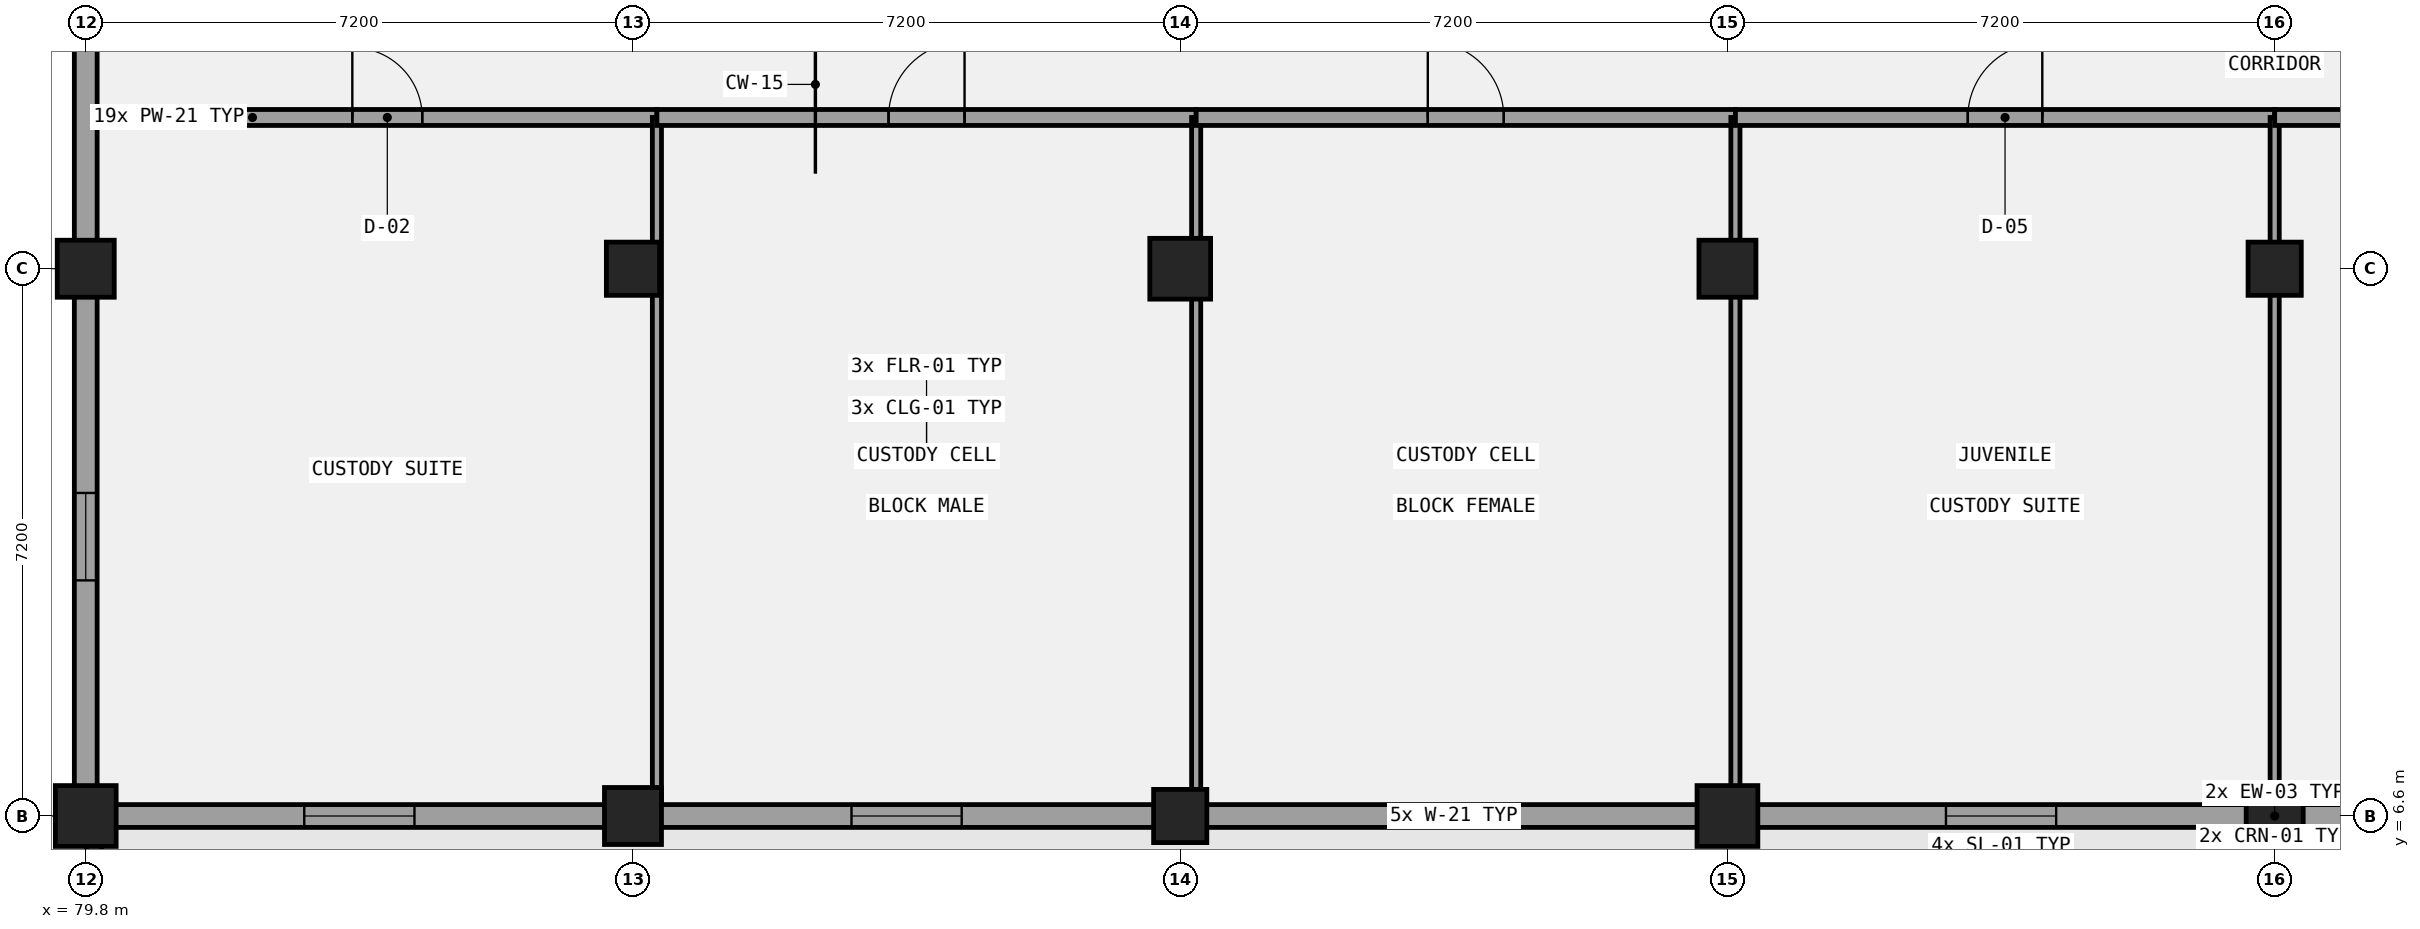
"""IFC4 building model, lengths in metres.
Left out: names, types, materials, properties, quantities, classifications, styles, units other than length and angle.
Written with IfcOpenShell. Run it as: python <this file> out.ifc"""

import sys

from ifc_helpers import new_model, si_unit, direction, frame, frame_2d, origin, origin_2d, place, context, subcontext, project, spatial, rectangle, extrude, element, fill, save


model = new_model("IFC4")
c1 = context("Model", 3, precision=1e-05, world=origin(), true_north=direction((0.0, 1.0)))
c2 = subcontext(c1, "Body", "Model", "MODEL_VIEW")
j1 = project(units=[si_unit("LENGTHUNIT", "METRE"), si_unit("PLANEANGLEUNIT", "RADIAN")], contexts=[c1])
p1 = place(None, origin())
s1 = spatial("IfcSite", under=j1, at=p1, CompositionType="ELEMENT")
p2 = place(p1, origin())
s2 = spatial("IfcBuilding", under=s1, at=p2, CompositionType="ELEMENT")
p3 = place(p2, frame((0.0, 0.0, 5.4)))
s3 = spatial("IfcBuildingStorey", under=s2, at=p3, CompositionType="ELEMENT", Elevation=5.4)
p4 = place(p3, frame((79.8, 6.6, 0.0), z_axis=(0.0, 0.0, 1.0), x_axis=(1.0, 0.0, 0.0)))
e1 = element("IfcColumn", 1, at=p4, inside=s3, PredefinedType="COLUMN", context=c2, shape_type="SweptSolid", body=[
    extrude(rectangle(XDim=0.8, YDim=0.8, at=origin_2d()), origin(), (0.0, 0.0, 1.0), 4.2),
])
for number, where, z_axis, x_axis in (
    (2, (79.8, 13.8, 0.0), (0.0, 0.0, 1.0), (1.0, 0.0, 0.0)),
    (3, (87.0, 6.6, 0.0), (0.0, 0.0, 1.0), (1.0, 0.0, 0.0)),
):
    element("IfcColumn", number, at=place(p3, frame(where, z_axis=z_axis, x_axis=x_axis)), inside=s3, PredefinedType="COLUMN", context=c2, shape_type="SweptSolid", body=[
        extrude(rectangle(XDim=0.75, YDim=0.75, at=origin_2d()), origin(), (0.0, 0.0, 1.0), 4.2),
    ])
for number, where, z_axis, x_axis in (
    (4, (87.0, 13.8, 0.0), (0.0, 0.0, 1.0), (1.0, 0.0, 0.0)),
    (5, (94.2, 6.6, 0.0), (0.0, 0.0, 1.0), (1.0, 0.0, 0.0)),
):
    element("IfcColumn", number, at=place(p3, frame(where, z_axis=z_axis, x_axis=x_axis)), inside=s3, PredefinedType="COLUMN", context=c2, shape_type="SweptSolid", body=[
        extrude(rectangle(XDim=0.7, YDim=0.7, at=origin_2d()), origin(), (0.0, 0.0, 1.0), 4.2),
    ])
for number, where, z_axis, x_axis in (
    (6, (94.2, 13.8, 0.0), (0.0, 0.0, 1.0), (1.0, 0.0, 0.0)),
    (7, (101.4, 6.6, 0.0), (0.0, 0.0, 1.0), (1.0, 0.0, 0.0)),
):
    element("IfcColumn", number, at=place(p3, frame(where, z_axis=z_axis, x_axis=x_axis)), inside=s3, PredefinedType="COLUMN", context=c2, shape_type="SweptSolid", body=[
        extrude(rectangle(XDim=0.8, YDim=0.8, at=origin_2d()), origin(), (0.0, 0.0, 1.0), 4.2),
    ])
for number, where, z_axis, x_axis in (
    (8, (101.4, 13.8, 0.0), (0.0, 0.0, 1.0), (1.0, 0.0, 0.0)),
    (9, (108.6, 6.6, 0.0), (0.0, 0.0, 1.0), (1.0, 0.0, 0.0)),
):
    element("IfcColumn", number, at=place(p3, frame(where, z_axis=z_axis, x_axis=x_axis)), inside=s3, PredefinedType="COLUMN", context=c2, shape_type="SweptSolid", body=[
        extrude(rectangle(XDim=0.75, YDim=0.75, at=origin_2d()), origin(), (0.0, 0.0, 1.0), 4.2),
    ])
p5 = place(p3, frame((108.6, 13.8, 0.0), z_axis=(0.0, 0.0, 1.0), x_axis=(1.0, 0.0, 0.0)))
e10 = element("IfcColumn", 10, at=p5, inside=s3, PredefinedType="COLUMN", context=c2, shape_type="SweptSolid", body=[
    extrude(rectangle(XDim=0.7, YDim=0.7, at=origin_2d()), origin(), (0.0, 0.0, 1.0), 4.2),
])
p6 = place(p3, frame((79.8, 27.95, 0.0), z_axis=(0.0, 0.0, 1.0), x_axis=(0.0, -1.0, 0.0)))
e11 = element("IfcWall", 11, at=p6, inside=s3, PredefinedType="SOLIDWALL", context=c2, shape_type="SweptSolid", body=[
    extrude(rectangle(XDim=21.2, YDim=0.3, at=frame_2d((10.6, 0.0))), origin(), (0.0, 0.0, 1.0), 3.27),
])
p7 = place(p6, frame((17.1, 0.0, 1.0)))
e12 = element("IfcOpeningElement", 12, at=p7, cuts=e11, PredefinedType="OPENING", context=c2, shape_type="SweptSolid", body=[
    extrude(rectangle(XDim=1.15, YDim=1.65, at=frame_2d((0.575, 0.825))), frame((0.0, 0.16, 0.0), z_axis=(0.0, -1.0, 0.0), x_axis=(1.0, 0.0, 0.0)), (0.0, 0.0, 1.0), 0.32),
])
p8 = place(p6, frame((9.975, 0.0, 1.0)))
e13 = element("IfcOpeningElement", 13, at=p8, cuts=e11, PredefinedType="OPENING", context=c2, shape_type="SweptSolid", body=[
    extrude(rectangle(XDim=1.15, YDim=1.65, at=frame_2d((0.575, 0.825))), frame((0.0, 0.16, 0.0), z_axis=(0.0, -1.0, 0.0), x_axis=(1.0, 0.0, 0.0)), (0.0, 0.0, 1.0), 0.32),
])
p9 = place(p6, frame((2.9, 0.0, 1.0)))
e14 = element("IfcOpeningElement", 14, at=p9, cuts=e11, PredefinedType="OPENING", context=c2, shape_type="SweptSolid", body=[
    extrude(rectangle(XDim=1.15, YDim=1.65, at=frame_2d((0.575, 0.825))), frame((0.0, 0.16, 0.0), z_axis=(0.0, -1.0, 0.0), x_axis=(1.0, 0.0, 0.0)), (0.0, 0.0, 1.0), 0.32),
])
p10 = place(p3, frame((79.65, 6.6, 0.0), z_axis=(0.0, 0.0, 1.0), x_axis=(1.0, 0.0, 0.0)))
e15 = element("IfcWall", 15, at=p10, inside=s3, PredefinedType="SOLIDWALL", context=c2, shape_type="SweptSolid", body=[
    extrude(rectangle(XDim=57.9, YDim=0.3, at=frame_2d((28.95, 0.0))), origin(), (0.0, 0.0, 1.0), 2.92),
])
p11 = place(p10, frame((3.025, 0.0, 1.0)))
e16 = element("IfcOpeningElement", 16, at=p11, cuts=e15, PredefinedType="OPENING", context=c2, shape_type="SweptSolid", body=[
    extrude(rectangle(XDim=1.45, YDim=1.4, at=frame_2d((0.725, 0.7))), frame((0.0, 0.16, 0.0), z_axis=(0.0, -1.0, 0.0), x_axis=(1.0, 0.0, 0.0)), (0.0, 0.0, 1.0), 0.32),
])
p12 = place(p10, frame((10.225, 0.0, 1.0)))
e17 = element("IfcOpeningElement", 17, at=p12, cuts=e15, PredefinedType="OPENING", context=c2, shape_type="SweptSolid", body=[
    extrude(rectangle(XDim=1.45, YDim=1.4, at=frame_2d((0.725, 0.7))), frame((0.0, 0.16, 0.0), z_axis=(0.0, -1.0, 0.0), x_axis=(1.0, 0.0, 0.0)), (0.0, 0.0, 1.0), 0.32),
])
p13 = place(p10, frame((17.425, 0.0, 1.0)))
e18 = element("IfcOpeningElement", 18, at=p13, cuts=e15, PredefinedType="OPENING", context=c2, shape_type="SweptSolid", body=[
    extrude(rectangle(XDim=1.45, YDim=1.4, at=frame_2d((0.725, 0.7))), frame((0.0, 0.16, 0.0), z_axis=(0.0, -1.0, 0.0), x_axis=(1.0, 0.0, 0.0)), (0.0, 0.0, 1.0), 0.32),
])
p14 = place(p10, frame((24.625, 0.0, 1.0)))
e19 = element("IfcOpeningElement", 19, at=p14, cuts=e15, PredefinedType="OPENING", context=c2, shape_type="SweptSolid", body=[
    extrude(rectangle(XDim=1.45, YDim=1.4, at=frame_2d((0.725, 0.7))), frame((0.0, 0.16, 0.0), z_axis=(0.0, -1.0, 0.0), x_axis=(1.0, 0.0, 0.0)), (0.0, 0.0, 1.0), 0.32),
])
p15 = place(p10, frame((31.825, 0.0, 1.0)))
e20 = element("IfcOpeningElement", 20, at=p15, cuts=e15, PredefinedType="OPENING", context=c2, shape_type="SweptSolid", body=[
    extrude(rectangle(XDim=1.45, YDim=1.4, at=frame_2d((0.725, 0.7))), frame((0.0, 0.16, 0.0), z_axis=(0.0, -1.0, 0.0), x_axis=(1.0, 0.0, 0.0)), (0.0, 0.0, 1.0), 0.32),
])
p16 = place(p10, frame((39.025, 0.0, 1.0)))
e21 = element("IfcOpeningElement", 21, at=p16, cuts=e15, PredefinedType="OPENING", context=c2, shape_type="SweptSolid", body=[
    extrude(rectangle(XDim=1.45, YDim=1.4, at=frame_2d((0.725, 0.7))), frame((0.0, 0.16, 0.0), z_axis=(0.0, -1.0, 0.0), x_axis=(1.0, 0.0, 0.0)), (0.0, 0.0, 1.0), 0.32),
])
p17 = place(p10, frame((46.225, 0.0, 1.0)))
e22 = element("IfcOpeningElement", 22, at=p17, cuts=e15, PredefinedType="OPENING", context=c2, shape_type="SweptSolid", body=[
    extrude(rectangle(XDim=1.45, YDim=1.4, at=frame_2d((0.725, 0.7))), frame((0.0, 0.16, 0.0), z_axis=(0.0, -1.0, 0.0), x_axis=(1.0, 0.0, 0.0)), (0.0, 0.0, 1.0), 0.32),
])
p18 = place(p10, frame((53.425, 0.0, 1.0)))
e23 = element("IfcOpeningElement", 23, at=p18, cuts=e15, PredefinedType="OPENING", context=c2, shape_type="SweptSolid", body=[
    extrude(rectangle(XDim=1.45, YDim=1.4, at=frame_2d((0.725, 0.7))), frame((0.0, 0.16, 0.0), z_axis=(0.0, -1.0, 0.0), x_axis=(1.0, 0.0, 0.0)), (0.0, 0.0, 1.0), 0.32),
])
p19 = place(p3, frame((79.91, 0.22, 0.0), z_axis=(0.0, 0.0, 1.0), x_axis=(0.0, 1.0, 0.0)))
e24 = element("IfcWall", 24, at=p19, inside=s3, PredefinedType="PARAPET", context=c2, shape_type="SweptSolid", body=[
    extrude(rectangle(XDim=6.05, YDim=0.2, at=frame_2d((3.025, 0.0))), origin(), (0.0, 0.0, 1.0), 1.12),
])
p20 = place(p3, frame((80.22, 15.79, 0.0), z_axis=(0.0, 0.0, 1.0), x_axis=(1.0, 0.0, 0.0)))
e25 = element("IfcWall", 25, at=p20, inside=s3, PredefinedType="PARTITIONING", context=c2, shape_type="SweptSolid", body=[
    extrude(rectangle(XDim=7.095, YDim=0.21, at=frame_2d((3.547, 0.0))), origin(), (0.0, 0.0, 1.0), 3.62),
])
p21 = place(p20, frame((3.087, 0.0, 0.0)))
e26 = element("IfcOpeningElement", 26, at=p21, cuts=e25, PredefinedType="OPENING", context=c2, shape_type="SweptSolid", body=[
    extrude(rectangle(XDim=0.92, YDim=2.22, at=frame_2d((0.46, 1.11))), frame((0.0, 0.115, 0.0), z_axis=(0.0, -1.0, 0.0), x_axis=(1.0, 0.0, 0.0)), (0.0, 0.0, 1.0), 0.23),
])
p22 = place(p3, frame((87.315, 6.78, 0.0), z_axis=(0.0, 0.0, 1.0), x_axis=(0.0, 1.0, 0.0)))
e27 = element("IfcWall", 27, at=p22, inside=s3, PredefinedType="PARTITIONING", context=c2, shape_type="SweptSolid", body=[
    extrude(rectangle(XDim=9.01, YDim=0.12, at=frame_2d((4.505, 0.0))), origin(), (0.0, 0.0, 1.0), 3.92),
])
p23 = place(p3, frame((87.315, 15.79, 0.0), z_axis=(0.0, 0.0, 1.0), x_axis=(1.0, 0.0, 0.0)))
e28 = element("IfcWall", 28, at=p23, inside=s3, PredefinedType="PARTITIONING", context=c2, shape_type="SweptSolid", body=[
    extrude(rectangle(XDim=7.095, YDim=0.21, at=frame_2d((3.547, 0.0))), origin(), (0.0, 0.0, 1.0), 3.56),
])
p24 = place(p23, frame((3.048, 0.0, 0.0)))
e29 = element("IfcOpeningElement", 29, at=p24, cuts=e28, PredefinedType="OPENING", context=c2, shape_type="SweptSolid", body=[
    extrude(rectangle(XDim=1.0, YDim=2.15, at=frame_2d((0.5, 1.075))), frame((0.0, 0.115, 0.0), z_axis=(0.0, -1.0, 0.0), x_axis=(1.0, 0.0, 0.0)), (0.0, 0.0, 1.0), 0.23),
])
p25 = place(p3, frame((94.41, 6.78, 0.0), z_axis=(0.0, 0.0, 1.0), x_axis=(0.0, 1.0, 0.0)))
e30 = element("IfcWall", 30, at=p25, inside=s3, PredefinedType="PARTITIONING", context=c2, shape_type="SweptSolid", body=[
    extrude(rectangle(XDim=9.01, YDim=0.12, at=frame_2d((4.505, 0.0))), origin(), (0.0, 0.0, 1.0), 3.17),
])
p26 = place(p3, frame((94.41, 15.79, 0.0), z_axis=(0.0, 0.0, 1.0), x_axis=(1.0, 0.0, 0.0)))
e31 = element("IfcWall", 31, at=p26, inside=s3, PredefinedType="PARTITIONING", context=c2, shape_type="SweptSolid", body=[
    extrude(rectangle(XDim=7.095, YDim=0.21, at=frame_2d((3.547, 0.0))), origin(), (0.0, 0.0, 1.0), 3.37),
])
p27 = place(p26, frame((3.048, 0.0, 0.0)))
e32 = element("IfcOpeningElement", 32, at=p27, cuts=e31, PredefinedType="OPENING", context=c2, shape_type="SweptSolid", body=[
    extrude(rectangle(XDim=1.0, YDim=2.15, at=frame_2d((0.5, 1.075))), frame((0.0, 0.115, 0.0), z_axis=(0.0, -1.0, 0.0), x_axis=(1.0, 0.0, 0.0)), (0.0, 0.0, 1.0), 0.23),
])
p28 = place(p3, frame((101.505, 6.78, 0.0), z_axis=(0.0, 0.0, 1.0), x_axis=(0.0, 1.0, 0.0)))
e33 = element("IfcWall", 33, at=p28, inside=s3, PredefinedType="PARTITIONING", context=c2, shape_type="SweptSolid", body=[
    extrude(rectangle(XDim=9.01, YDim=0.12, at=frame_2d((4.505, 0.0))), origin(), (0.0, 0.0, 1.0), 3.17),
])
p29 = place(p3, frame((101.505, 15.79, 0.0), z_axis=(0.0, 0.0, 1.0), x_axis=(1.0, 0.0, 0.0)))
e34 = element("IfcWall", 34, at=p29, inside=s3, PredefinedType="PARTITIONING", context=c2, shape_type="SweptSolid", body=[
    extrude(rectangle(XDim=7.095, YDim=0.21, at=frame_2d((3.548, 0.0))), origin(), (0.0, 0.0, 1.0), 3.37),
])
p30 = place(p29, frame((3.058, 0.0, 0.0)))
e35 = element("IfcOpeningElement", 35, at=p30, cuts=e34, PredefinedType="OPENING", context=c2, shape_type="SweptSolid", body=[
    extrude(rectangle(XDim=0.98, YDim=2.22, at=frame_2d((0.49, 1.11))), frame((0.0, 0.115, 0.0), z_axis=(0.0, -1.0, 0.0), x_axis=(1.0, 0.0, 0.0)), (0.0, 0.0, 1.0), 0.23),
])
p31 = place(p3, frame((108.6, 6.78, 0.0), z_axis=(0.0, 0.0, 1.0), x_axis=(0.0, 1.0, 0.0)))
e36 = element("IfcWall", 36, at=p31, inside=s3, PredefinedType="PARTITIONING", context=c2, shape_type="SweptSolid", body=[
    extrude(rectangle(XDim=9.01, YDim=0.12, at=frame_2d((4.505, 0.0))), origin(), (0.0, 0.0, 1.0), 3.12),
])
p32 = place(p3, frame((108.6, 15.79, 0.0), z_axis=(0.0, 0.0, 1.0), x_axis=(1.0, 0.0, 0.0)))
e37 = element("IfcWall", 37, at=p32, inside=s3, PredefinedType="PARTITIONING", context=c2, shape_type="SweptSolid", body=[
    extrude(rectangle(XDim=7.095, YDim=0.21, at=frame_2d((3.547, 0.0))), origin(), (0.0, 0.0, 1.0), 3.37),
])
p33 = place(p32, frame((3.058, 0.0, 0.0)))
e38 = element("IfcOpeningElement", 38, at=p33, cuts=e37, PredefinedType="OPENING", context=c2, shape_type="SweptSolid", body=[
    extrude(rectangle(XDim=0.98, YDim=2.35, at=frame_2d((0.49, 1.175))), frame((0.0, 0.115, 0.0), z_axis=(0.0, -1.0, 0.0), x_axis=(1.0, 0.0, 0.0)), (0.0, 0.0, 1.0), 0.23),
])
p34 = place(p7, origin())
e39 = element("IfcWindow", 39, at=p34, inside=s3, PartitioningType="SINGLE_PANEL", PredefinedType="WINDOW", context=c2, shape_type="SweptSolid", body=[
    extrude(rectangle(XDim=1.15, YDim=1.65, at=frame_2d((0.575, 0.825))), frame((0.0, 0.03, 0.0), z_axis=(0.0, -1.0, 0.0), x_axis=(1.0, 0.0, 0.0)), (0.0, 0.0, 1.0), 0.06),
])
fill(e12, e39)
p35 = place(p11, origin())
e40 = element("IfcWindow", 40, at=p35, inside=s3, PartitioningType="SINGLE_PANEL", PredefinedType="WINDOW", context=c2, shape_type="SweptSolid", body=[
    extrude(rectangle(XDim=1.45, YDim=1.4, at=frame_2d((0.725, 0.7))), frame((0.0, 0.03, 0.0), z_axis=(0.0, -1.0, 0.0), x_axis=(1.0, 0.0, 0.0)), (0.0, 0.0, 1.0), 0.06),
])
fill(e16, e40)
p36 = place(p12, origin())
e41 = element("IfcWindow", 41, at=p36, inside=s3, PartitioningType="SINGLE_PANEL", PredefinedType="WINDOW", context=c2, shape_type="SweptSolid", body=[
    extrude(rectangle(XDim=1.45, YDim=1.4, at=frame_2d((0.725, 0.7))), frame((0.0, 0.03, 0.0), z_axis=(0.0, -1.0, 0.0), x_axis=(1.0, 0.0, 0.0)), (0.0, 0.0, 1.0), 0.06),
])
fill(e17, e41)
p37 = place(p13, origin())
e42 = element("IfcWindow", 42, at=p37, inside=s3, PartitioningType="SINGLE_PANEL", PredefinedType="WINDOW", context=c2, shape_type="SweptSolid", body=[
    extrude(rectangle(XDim=1.45, YDim=1.4, at=frame_2d((0.725, 0.7))), frame((0.0, 0.03, 0.0), z_axis=(0.0, -1.0, 0.0), x_axis=(1.0, 0.0, 0.0)), (0.0, 0.0, 1.0), 0.06),
])
fill(e18, e42)
p38 = place(p14, origin())
e43 = element("IfcWindow", 43, at=p38, inside=s3, PartitioningType="SINGLE_PANEL", PredefinedType="WINDOW", context=c2, shape_type="SweptSolid", body=[
    extrude(rectangle(XDim=1.45, YDim=1.4, at=frame_2d((0.725, 0.7))), frame((0.0, 0.03, 0.0), z_axis=(0.0, -1.0, 0.0), x_axis=(1.0, 0.0, 0.0)), (0.0, 0.0, 1.0), 0.06),
])
fill(e19, e43)
p39 = place(p21, frame((0.92, 0.0, 0.0), z_axis=(0.0, 0.0, 1.0), x_axis=(-1.0, 0.0, 0.0)))
e44 = element("IfcDoor", 44, at=p39, inside=s3, OperationType="SINGLE_SWING_LEFT", PredefinedType="DOOR", context=c2, shape_type="SweptSolid", body=[
    extrude(rectangle(XDim=0.92, YDim=2.22, at=frame_2d((0.46, 1.11))), frame((0.0, 0.025, 0.0), z_axis=(0.0, -1.0, 0.0), x_axis=(1.0, 0.0, 0.0)), (0.0, 0.0, 1.0), 0.05),
])
fill(e26, e44)
p40 = place(p24, frame((1.0, 0.0, 0.0), z_axis=(0.0, 0.0, 1.0), x_axis=(-1.0, 0.0, 0.0)))
e45 = element("IfcDoor", 45, at=p40, inside=s3, OperationType="SINGLE_SWING_RIGHT", PredefinedType="DOOR", context=c2, shape_type="SweptSolid", body=[
    extrude(rectangle(XDim=1.0, YDim=2.15, at=frame_2d((0.5, 1.075))), frame((0.0, 0.025, 0.0), z_axis=(0.0, -1.0, 0.0), x_axis=(1.0, 0.0, 0.0)), (0.0, 0.0, 1.0), 0.05),
])
fill(e29, e45)
p41 = place(p27, frame((1.0, 0.0, 0.0), z_axis=(0.0, 0.0, 1.0), x_axis=(-1.0, 0.0, 0.0)))
e46 = element("IfcDoor", 46, at=p41, inside=s3, OperationType="SINGLE_SWING_LEFT", PredefinedType="DOOR", context=c2, shape_type="SweptSolid", body=[
    extrude(rectangle(XDim=1.0, YDim=2.15, at=frame_2d((0.5, 1.075))), frame((0.0, 0.025, 0.0), z_axis=(0.0, -1.0, 0.0), x_axis=(1.0, 0.0, 0.0)), (0.0, 0.0, 1.0), 0.05),
])
fill(e32, e46)
p42 = place(p30, frame((0.98, 0.0, 0.0), z_axis=(0.0, 0.0, 1.0), x_axis=(-1.0, 0.0, 0.0)))
e47 = element("IfcDoor", 47, at=p42, inside=s3, OperationType="SINGLE_SWING_RIGHT", PredefinedType="DOOR", context=c2, shape_type="SweptSolid", body=[
    extrude(rectangle(XDim=0.98, YDim=2.22, at=frame_2d((0.49, 1.11))), frame((0.0, 0.025, 0.0), z_axis=(0.0, -1.0, 0.0), x_axis=(1.0, 0.0, 0.0)), (0.0, 0.0, 1.0), 0.05),
])
fill(e35, e47)
save(model, sys.argv[1])
